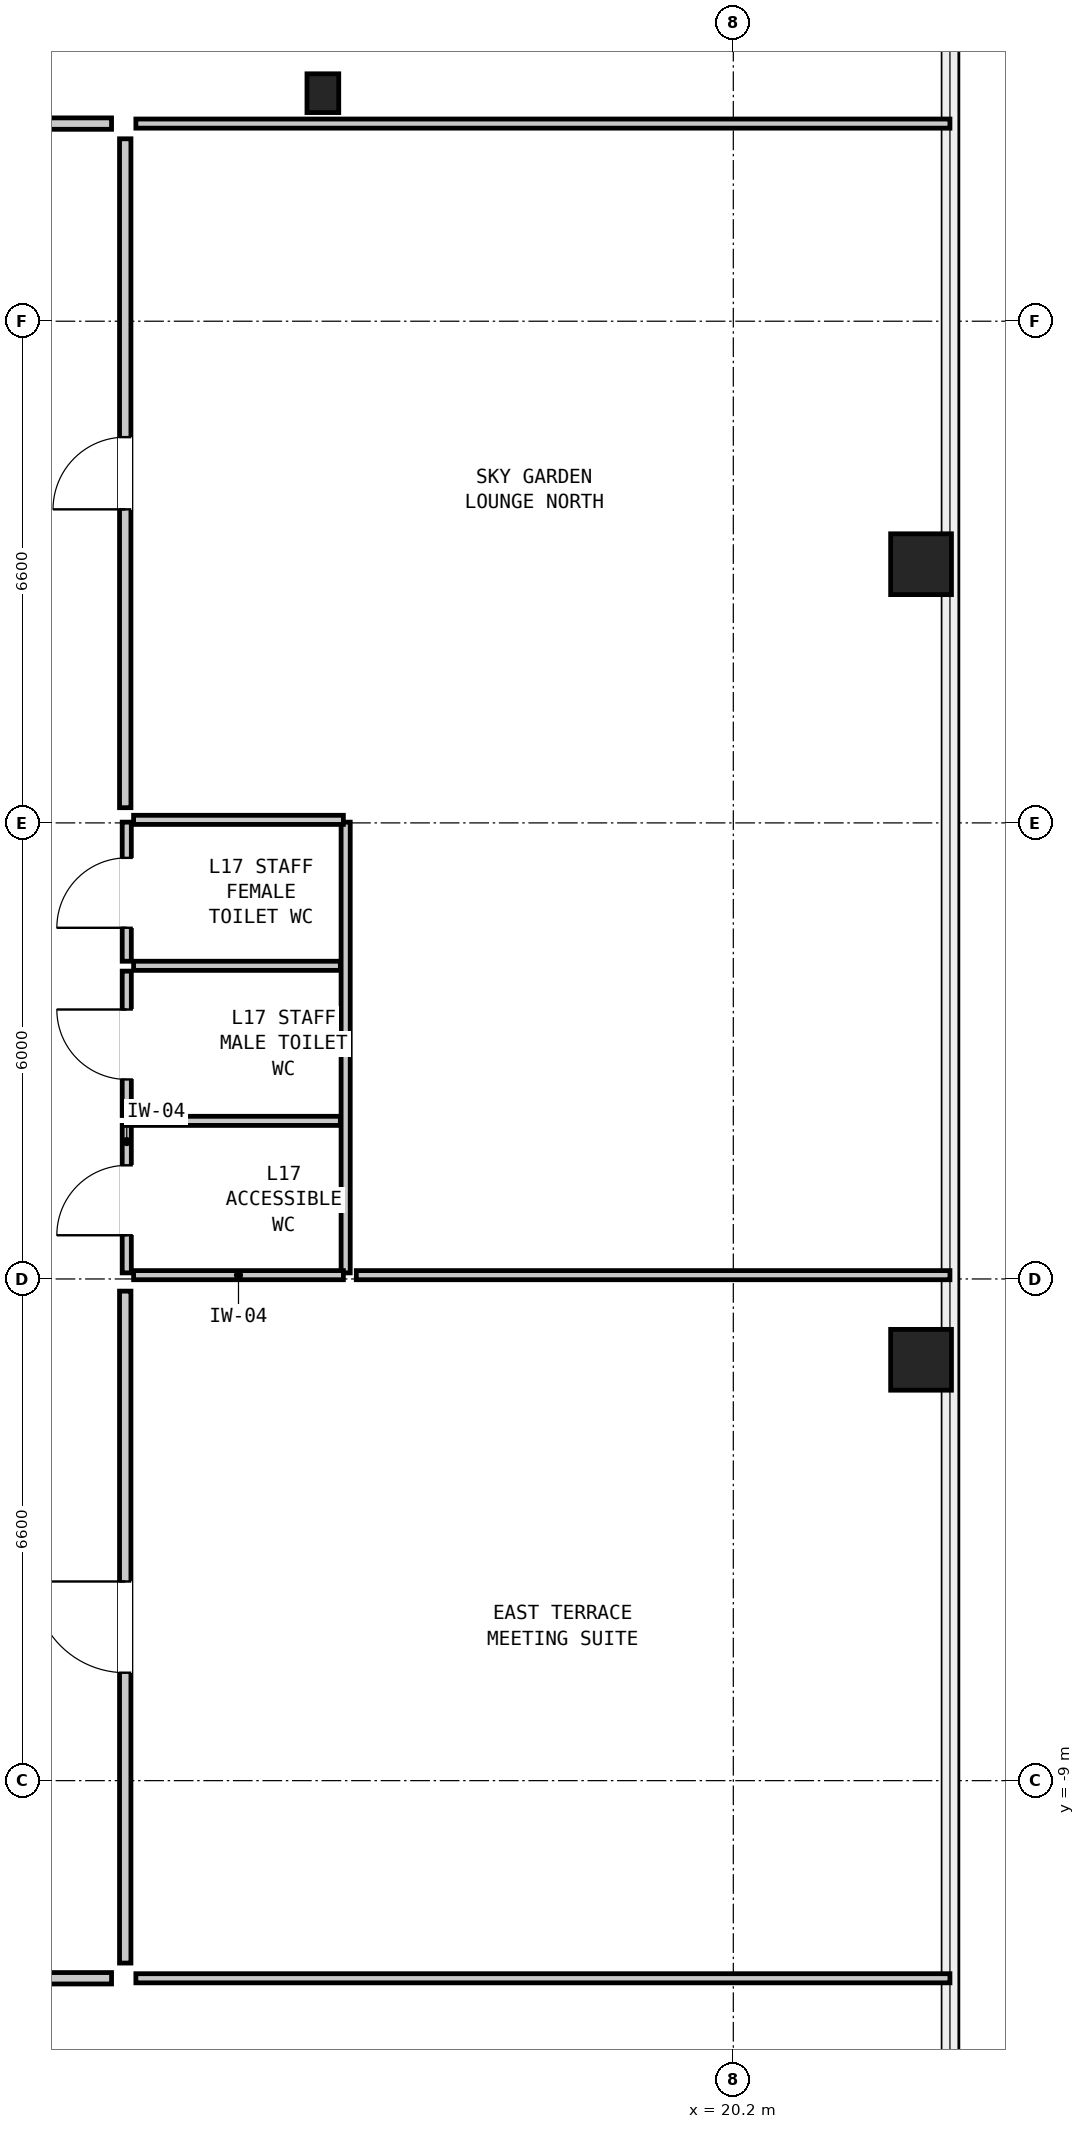
"""IFC4 building model, lengths in metres.
Left out: names, types, materials, properties, quantities, classifications, styles, units other than length and angle.
Written with IfcOpenShell. Run it as: python <this file> out.ifc"""

import sys

from ifc_helpers import new_model, si_unit, direction, frame, frame_2d, origin, origin_2d, place, context, subcontext, project, spatial, rectangle, hollow_rectangle, i_section, extrude, element, fill, save


model = new_model("IFC4")
c1 = context("Model", 3, precision=1e-05, world=origin(), true_north=direction((0.0, 1.0)))
c2 = subcontext(c1, "Body", "Model", "MODEL_VIEW")
j1 = project(units=[si_unit("LENGTHUNIT", "METRE"), si_unit("PLANEANGLEUNIT", "RADIAN")], contexts=[c1])
p1 = place(None, origin())
s1 = spatial("IfcSite", under=j1, at=p1, CompositionType="ELEMENT")
p2 = place(p1, origin())
s2 = spatial("IfcBuilding", under=s1, at=p2, CompositionType="ELEMENT")
p3 = place(p2, frame((0.0, 0.0, 61.5)))
s3 = spatial("IfcBuildingStorey", under=s2, at=p3, CompositionType="ELEMENT", Elevation=61.5)
for number, where, z_axis, x_axis in (
    (1, (22.67, -3.463, 0.0), (0.0, 0.0, 1.0), (0.0, 1.0, 0.0)),
    (2, (22.67, 7.003, 0.0), (0.0, 0.0, 1.0), (0.0, 1.0, 0.0)),
):
    element("IfcColumn", number, at=place(p3, frame(where, z_axis=z_axis, x_axis=x_axis)), inside=s3, PredefinedType="COLUMN", context=c2, shape_type="SweptSolid", body=[
        extrude(hollow_rectangle(XDim=0.8, YDim=0.8, WallThickness=0.05, at=origin_2d()), origin(), (0.0, 0.0, 1.0), 3.6),
    ])
p4 = place(p3, frame((14.8, 13.2, 0.0), z_axis=(0.0, 0.0, 1.0), x_axis=(1.0, 0.0, 0.0)))
e3 = element("IfcColumn", 3, at=p4, inside=s3, PredefinedType="COLUMN", context=c2, shape_type="SweptSolid", body=[
    extrude(i_section(OverallWidth=0.418, OverallDepth=0.51, WebThickness=0.042, FlangeThickness=0.068, at=origin_2d()), origin(), (0.0, 0.0, 1.0), 3.6),
])
p5 = place(p3, frame((12.22, -2.32, 0.0), z_axis=(0.0, 0.0, 1.0), x_axis=(0.0, 1.0, 0.0)))
e4 = element("IfcWall", 4, at=p5, inside=s3, PredefinedType="PARTITIONING", context=c2, shape_type="SweptSolid", body=[
    extrude(rectangle(XDim=1.94, YDim=0.12, at=frame_2d((0.97, 0.0))), origin(), (0.0, 0.0, 1.0), 3.22),
])
p6 = place(p5, frame((0.495, 0.0, 0.0)))
e5 = element("IfcOpeningElement", 5, at=p6, cuts=e4, PredefinedType="OPENING", context=c2, shape_type="SweptSolid", body=[
    extrude(rectangle(XDim=0.92, YDim=2.1, at=frame_2d((0.46, 1.05))), frame((0.0, 0.072, 0.0), z_axis=(0.0, -1.0, 0.0), x_axis=(1.0, 0.0, 0.0)), (0.0, 0.0, 1.0), 0.144),
])
p7 = place(p3, frame((12.22, -0.25, 0.0), z_axis=(0.0, 0.0, 1.0), x_axis=(0.0, 1.0, 0.0)))
e6 = element("IfcWall", 6, at=p7, inside=s3, PredefinedType="PARTITIONING", context=c2, shape_type="SweptSolid", body=[
    extrude(rectangle(XDim=1.9, YDim=0.12, at=frame_2d((0.95, 0.0))), origin(), (0.0, 0.0, 1.0), 3.22),
])
p8 = place(p7, frame((0.475, 0.0, 0.0)))
e7 = element("IfcOpeningElement", 7, at=p8, cuts=e6, PredefinedType="OPENING", context=c2, shape_type="SweptSolid", body=[
    extrude(rectangle(XDim=0.92, YDim=2.1, at=frame_2d((0.46, 1.05))), frame((0.0, 0.072, 0.0), z_axis=(0.0, -1.0, 0.0), x_axis=(1.0, 0.0, 0.0)), (0.0, 0.0, 1.0), 0.144),
])
p9 = place(p3, frame((12.22, 1.78, 0.0), z_axis=(0.0, 0.0, 1.0), x_axis=(0.0, 1.0, 0.0)))
e8 = element("IfcWall", 8, at=p9, inside=s3, PredefinedType="PARTITIONING", context=c2, shape_type="SweptSolid", body=[
    extrude(rectangle(XDim=1.83, YDim=0.12, at=frame_2d((0.915, 0.0))), origin(), (0.0, 0.0, 1.0), 3.22),
])
p10 = place(p9, frame((0.44, 0.0, 0.0)))
e9 = element("IfcOpeningElement", 9, at=p10, cuts=e8, PredefinedType="OPENING", context=c2, shape_type="SweptSolid", body=[
    extrude(rectangle(XDim=0.92, YDim=2.1, at=frame_2d((0.46, 1.05))), frame((0.0, 0.072, 0.0), z_axis=(0.0, -1.0, 0.0), x_axis=(1.0, 0.0, 0.0)), (0.0, 0.0, 1.0), 0.144),
])
p11 = place(p3, frame((15.1, -2.32, 0.0), z_axis=(0.0, 0.0, 1.0), x_axis=(0.0, 1.0, 0.0)))
e10 = element("IfcWall", 10, at=p11, inside=s3, PredefinedType="PARTITIONING", context=c2, shape_type="SweptSolid", body=[
    extrude(rectangle(XDim=5.93, YDim=0.12, at=frame_2d((2.965, 0.0))), origin(), (0.0, 0.0, 1.0), 3.22),
])
for number, where, z_axis, x_axis in (
    (11, (12.31, -2.35, 0.0), (0.0, 0.0, 1.0), (1.0, 0.0, 0.0)),
    (12, (12.31, 3.64, 0.0), (0.0, 0.0, 1.0), (1.0, 0.0, 0.0)),
):
    element("IfcWall", number, at=place(p3, frame(where, z_axis=z_axis, x_axis=x_axis)), inside=s3, PredefinedType="PARTITIONING", context=c2, shape_type="SweptSolid", body=[
        extrude(rectangle(XDim=2.76, YDim=0.12, at=frame_2d((1.38, 0.0))), origin(), (0.0, 0.0, 1.0), 2.42),
    ])
for number, where, z_axis, x_axis in (
    (13, (12.31, -0.32, 0.0), (0.0, 0.0, 1.0), (1.0, 0.0, 0.0)),
    (14, (12.31, 1.72, 0.0), (0.0, 0.0, 1.0), (1.0, 0.0, 0.0)),
):
    element("IfcWall", number, at=place(p3, frame(where, z_axis=z_axis, x_axis=x_axis)), inside=s3, PredefinedType="PARTITIONING", context=c2, shape_type="SweptSolid", body=[
        extrude(rectangle(XDim=2.72, YDim=0.12, at=frame_2d((1.36, 0.0))), origin(), (0.0, 0.0, 1.0), 3.22),
    ])
p12 = place(p3, frame((12.34, 12.8, 0.0), z_axis=(0.0, 0.0, 1.0), x_axis=(1.0, 0.0, 0.0)))
e15 = element("IfcWall", 15, at=p12, inside=s3, PredefinedType="PARTITIONING", context=c2, shape_type="SweptSolid", body=[
    extrude(rectangle(XDim=10.71, YDim=0.12, at=frame_2d((5.355, 0.0))), origin(), (0.0, 0.0, 1.0), 3.22),
])
p13 = place(p3, frame((12.34, -11.6, 0.0), z_axis=(0.0, 0.0, 1.0), x_axis=(1.0, 0.0, 0.0)))
e16 = element("IfcWall", 16, at=p13, inside=s3, PredefinedType="PARTITIONING", context=c2, shape_type="SweptSolid", body=[
    extrude(rectangle(XDim=10.71, YDim=0.12, at=frame_2d((5.355, 0.0))), origin(), (0.0, 0.0, 1.0), 2.438),
])
p14 = place(p3, frame((15.24, -2.35, 0.0), z_axis=(0.0, 0.0, 1.0), x_axis=(1.0, 0.0, 0.0)))
e17 = element("IfcWall", 17, at=p14, inside=s3, PredefinedType="PARTITIONING", context=c2, shape_type="SweptSolid", body=[
    extrude(rectangle(XDim=7.81, YDim=0.12, at=frame_2d((3.905, 0.0))), origin(), (0.0, 0.0, 1.0), 2.42),
])
p15 = place(p3, frame((4.98, 12.8, 0.0), z_axis=(0.0, 0.0, 1.0), x_axis=(1.0, 0.0, 0.0)))
e18 = element("IfcWall", 18, at=p15, inside=s3, PredefinedType="PARTITIONING", context=c2, shape_type="SweptSolid", body=[
    extrude(rectangle(XDim=7.04, YDim=0.15, at=frame_2d((3.52, 0.0))), origin(), (0.0, 0.0, 1.0), 3.22),
])
p16 = place(p15, frame((2.92, 0.0, 0.0)))
e19 = element("IfcOpeningElement", 19, at=p16, cuts=e18, PredefinedType="OPENING", context=c2, shape_type="SweptSolid", body=[
    extrude(rectangle(XDim=1.2, YDim=2.1, at=frame_2d((0.6, 1.05))), frame((0.0, 0.087, 0.0), z_axis=(0.0, -1.0, 0.0), x_axis=(1.0, 0.0, 0.0)), (0.0, 0.0, 1.0), 0.174),
])
p17 = place(p3, frame((4.68, -11.6, 0.0), z_axis=(0.0, 0.0, 1.0), x_axis=(1.0, 0.0, 0.0)))
e20 = element("IfcWall", 20, at=p17, inside=s3, PredefinedType="PARTITIONING", context=c2, shape_type="SweptSolid", body=[
    extrude(rectangle(XDim=7.34, YDim=0.15, at=frame_2d((3.67, 0.0))), origin(), (0.0, 0.0, 1.0), 2.438),
])
p18 = place(p17, frame((3.195, 0.0, 0.0)))
e21 = element("IfcOpeningElement", 21, at=p18, cuts=e20, PredefinedType="OPENING", context=c2, shape_type="SweptSolid", body=[
    extrude(rectangle(XDim=0.95, YDim=2.1, at=frame_2d((0.475, 1.05))), frame((0.0, 0.087, 0.0), z_axis=(0.0, -1.0, 0.0), x_axis=(1.0, 0.0, 0.0)), (0.0, 0.0, 1.0), 0.174),
])
p19 = place(p3, frame((12.2, -11.4, 0.0), z_axis=(0.0, 0.0, 1.0), x_axis=(0.0, 1.0, 0.0)))
e22 = element("IfcWall", 22, at=p19, inside=s3, PredefinedType="PARTITIONING", context=c2, shape_type="SweptSolid", body=[
    extrude(rectangle(XDim=8.84, YDim=0.15, at=frame_2d((4.42, 0.0))), origin(), (0.0, 0.0, 1.0), 3.22),
])
p20 = place(p19, frame((3.82, 0.0, 0.0)))
e23 = element("IfcOpeningElement", 23, at=p20, cuts=e22, PredefinedType="OPENING", context=c2, shape_type="SweptSolid", body=[
    extrude(rectangle(XDim=1.2, YDim=2.1, at=frame_2d((0.6, 1.05))), frame((0.0, 0.087, 0.0), z_axis=(0.0, -1.0, 0.0), x_axis=(1.0, 0.0, 0.0)), (0.0, 0.0, 1.0), 0.174),
])
p21 = place(p3, frame((12.2, 3.8, 0.0), z_axis=(0.0, 0.0, 1.0), x_axis=(0.0, 1.0, 0.0)))
e24 = element("IfcWall", 24, at=p21, inside=s3, PredefinedType="PARTITIONING", context=c2, shape_type="SweptSolid", body=[
    extrude(rectangle(XDim=8.8, YDim=0.15, at=frame_2d((4.4, 0.0))), origin(), (0.0, 0.0, 1.0), 3.22),
])
p22 = place(p21, frame((3.925, 0.0, 0.0)))
e25 = element("IfcOpeningElement", 25, at=p22, cuts=e24, PredefinedType="OPENING", context=c2, shape_type="SweptSolid", body=[
    extrude(rectangle(XDim=0.95, YDim=2.1, at=frame_2d((0.475, 1.05))), frame((0.0, 0.087, 0.0), z_axis=(0.0, -1.0, 0.0), x_axis=(1.0, 0.0, 0.0)), (0.0, 0.0, 1.0), 0.174),
])
p23 = place(p6, origin())
e26 = element("IfcDoor", 26, at=p23, inside=s3, OperationType="SINGLE_SWING_LEFT", PredefinedType="DOOR", context=c2, shape_type="SweptSolid", body=[
    extrude(rectangle(XDim=0.92, YDim=2.1, at=frame_2d((0.46, 1.05))), frame((0.0, 0.025, 0.0), z_axis=(0.0, -1.0, 0.0), x_axis=(1.0, 0.0, 0.0)), (0.0, 0.0, 1.0), 0.05),
])
fill(e5, e26)
p24 = place(p8, origin())
e27 = element("IfcDoor", 27, at=p24, inside=s3, OperationType="SINGLE_SWING_RIGHT", PredefinedType="DOOR", context=c2, shape_type="SweptSolid", body=[
    extrude(rectangle(XDim=0.92, YDim=2.1, at=frame_2d((0.46, 1.05))), frame((0.0, 0.025, 0.0), z_axis=(0.0, -1.0, 0.0), x_axis=(1.0, 0.0, 0.0)), (0.0, 0.0, 1.0), 0.05),
])
fill(e7, e27)
p25 = place(p10, origin())
e28 = element("IfcDoor", 28, at=p25, inside=s3, OperationType="SINGLE_SWING_LEFT", PredefinedType="DOOR", context=c2, shape_type="SweptSolid", body=[
    extrude(rectangle(XDim=0.92, YDim=2.1, at=frame_2d((0.46, 1.05))), frame((0.0, 0.025, 0.0), z_axis=(0.0, -1.0, 0.0), x_axis=(1.0, 0.0, 0.0)), (0.0, 0.0, 1.0), 0.05),
])
fill(e9, e28)
p26 = place(p20, origin())
e29 = element("IfcDoor", 29, at=p26, inside=s3, OperationType="SINGLE_SWING_RIGHT", PredefinedType="DOOR", context=c2, shape_type="SweptSolid", body=[
    extrude(rectangle(XDim=1.2, YDim=2.1, at=frame_2d((0.6, 1.05))), frame((0.0, 0.025, 0.0), z_axis=(0.0, -1.0, 0.0), x_axis=(1.0, 0.0, 0.0)), (0.0, 0.0, 1.0), 0.05),
])
fill(e23, e29)
p27 = place(p22, origin())
e30 = element("IfcDoor", 30, at=p27, inside=s3, OperationType="SINGLE_SWING_LEFT", PredefinedType="DOOR", context=c2, shape_type="SweptSolid", body=[
    extrude(rectangle(XDim=0.95, YDim=2.1, at=frame_2d((0.475, 1.05))), frame((0.0, 0.025, 0.0), z_axis=(0.0, -1.0, 0.0), x_axis=(1.0, 0.0, 0.0)), (0.0, 0.0, 1.0), 0.05),
])
fill(e25, e30)
save(model, sys.argv[1])
